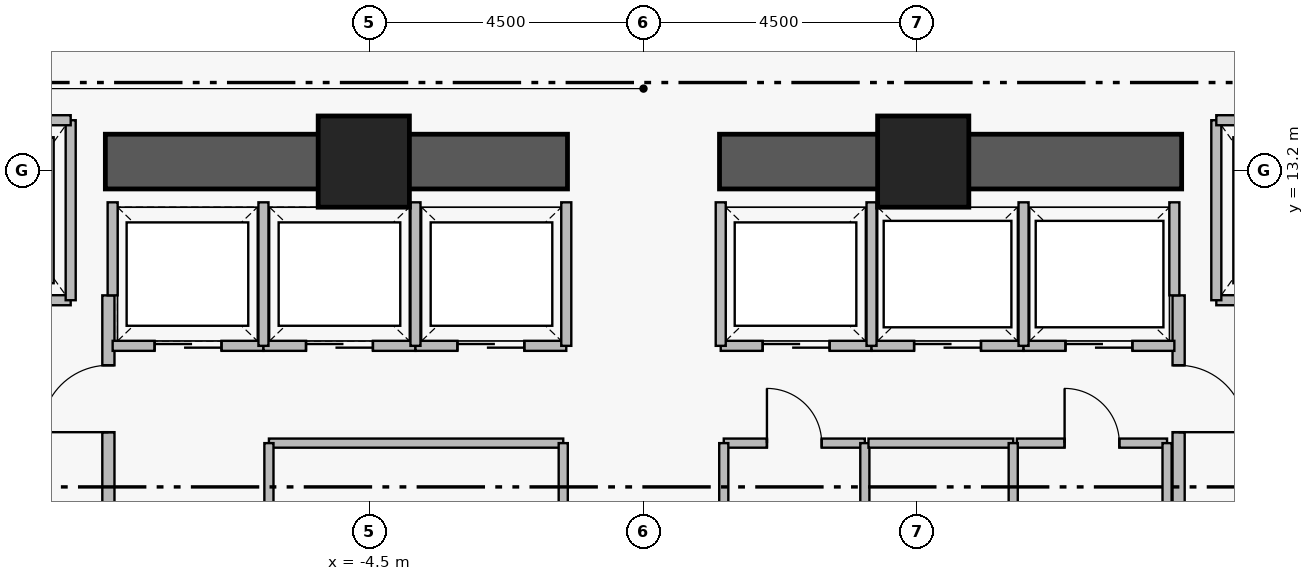
"""IFC4 building model, lengths in metres.
Left out: names, types, materials, properties, quantities, classifications, styles, units other than length and angle.
Written with IfcOpenShell. Run it as: python <this file> out.ifc"""

import sys

from ifc_helpers import new_model, si_unit, direction, frame, frame_2d, origin, origin_2d, place, context, subcontext, project, spatial, rectangle, extrude, element, fill, save


model = new_model("IFC4")
c1 = context("Model", 3, precision=1e-05, world=origin(), true_north=direction((0.0, 1.0)))
c2 = subcontext(c1, "Body", "Model", "MODEL_VIEW")
j1 = project(units=[si_unit("LENGTHUNIT", "METRE"), si_unit("PLANEANGLEUNIT", "RADIAN")], contexts=[c1])
p1 = place(None, origin())
s1 = spatial("IfcSite", under=j1, at=p1, CompositionType="ELEMENT")
p2 = place(p1, origin())
s2 = spatial("IfcBuilding", under=s1, at=p2, CompositionType="ELEMENT")
p3 = place(p2, origin())
s3 = spatial("IfcBuildingStorey", under=s2, at=p3, CompositionType="ELEMENT", Elevation=0.0)
for number, where, z_axis, x_axis in (
    (1, (-8.85, 13.35, 0.0), (0.0, 0.0, 1.0), (1.0, 0.0, 0.0)),
    (2, (1.25, 13.35, 0.0), (0.0, 0.0, 1.0), (1.0, 0.0, 0.0)),
):
    element("IfcWall", number, at=place(p3, frame(where, z_axis=z_axis, x_axis=x_axis)), inside=s3, PredefinedType="SHEAR", context=c2, shape_type="SweptSolid", body=[
        extrude(rectangle(XDim=7.6, YDim=0.9, at=frame_2d((3.8, 0.0))), origin(), (0.0, 0.0, 1.0), 5.75),
    ])
for number, where, z_axis, x_axis in (
    (3, (-4.6, 13.35, 0.0), (0.0, 0.0, 1.0), (1.0, 0.0, 0.0)),
    (4, (4.6, 13.35, 0.0), (0.0, 0.0, 1.0), (1.0, 0.0, 0.0)),
):
    element("IfcColumn", number, at=place(p3, frame(where, z_axis=z_axis, x_axis=x_axis)), inside=s3, PredefinedType="COLUMN", context=c2, shape_type="SweptSolid", body=[
        extrude(rectangle(XDim=1.5, YDim=1.5, at=origin_2d()), origin(), (0.0, 0.0, 1.0), 6.0),
    ])
p4 = place(p3, frame((-8.8, 5.05, 0.0), z_axis=(0.0, 0.0, 1.0), x_axis=(0.0, 1.0, 0.0)))
e5 = element("IfcWall", 5, at=p4, inside=s3, PredefinedType="PARTITIONING", context=c2, shape_type="SweptSolid", body=[
    extrude(rectangle(XDim=6.1, YDim=0.2, at=frame_2d((3.05, 0.0))), origin(), (0.0, 0.0, 1.0), 5.75),
])
p5 = place(p4, frame((0.25, 0.0, 0.0)))
e6 = element("IfcOpeningElement", 6, at=p5, cuts=e5, PredefinedType="OPENING", context=c2, shape_type="SweptSolid", body=[
    extrude(rectangle(XDim=1.1, YDim=2.2, at=frame_2d((0.55, 1.1))), frame((0.0, 0.11, 0.0), z_axis=(0.0, -1.0, 0.0), x_axis=(1.0, 0.0, 0.0)), (0.0, 0.0, 1.0), 0.22),
])
p6 = place(p4, frame((3.85, 0.0, 0.0)))
e7 = element("IfcOpeningElement", 7, at=p6, cuts=e5, PredefinedType="OPENING", context=c2, shape_type="SweptSolid", body=[
    extrude(rectangle(XDim=1.1, YDim=2.2, at=frame_2d((0.55, 1.1))), frame((0.0, 0.11, 0.0), z_axis=(0.0, -1.0, 0.0), x_axis=(1.0, 0.0, 0.0)), (0.0, 0.0, 1.0), 0.22),
])
p7 = place(p3, frame((8.8, 11.15, 0.0), z_axis=(0.0, 0.0, 1.0), x_axis=(0.0, -1.0, 0.0)))
e8 = element("IfcWall", 8, at=p7, inside=s3, PredefinedType="PARTITIONING", context=c2, shape_type="SweptSolid", body=[
    extrude(rectangle(XDim=6.1, YDim=0.2, at=frame_2d((3.05, 0.0))), origin(), (0.0, 0.0, 1.0), 5.75),
])
p8 = place(p7, frame((1.15, 0.0, 0.0)))
e9 = element("IfcOpeningElement", 9, at=p8, cuts=e8, PredefinedType="OPENING", context=c2, shape_type="SweptSolid", body=[
    extrude(rectangle(XDim=1.1, YDim=2.2, at=frame_2d((0.55, 1.1))), frame((0.0, 0.11, 0.0), z_axis=(0.0, -1.0, 0.0), x_axis=(1.0, 0.0, 0.0)), (0.0, 0.0, 1.0), 0.22),
])
p9 = place(p7, frame((4.75, 0.0, 0.0)))
e10 = element("IfcOpeningElement", 10, at=p9, cuts=e8, PredefinedType="OPENING", context=c2, shape_type="SweptSolid", body=[
    extrude(rectangle(XDim=1.1, YDim=2.2, at=frame_2d((0.55, 1.1))), frame((0.0, 0.11, 0.0), z_axis=(0.0, -1.0, 0.0), x_axis=(1.0, 0.0, 0.0)), (0.0, 0.0, 1.0), 0.22),
])
p10 = place(p3, frame((-11.58, 11.07, 0.0), z_axis=(0.0, 0.0, 1.0), x_axis=(1.0, 0.0, 0.0)))
e11 = element("IfcWall", 11, at=p10, inside=s3, PredefinedType="PARTITIONING", context=c2, shape_type="SweptSolid", body=[
    extrude(rectangle(XDim=2.16, YDim=0.165, at=frame_2d((1.08, 0.0))), origin(), (0.0, 0.0, 1.0), 5.75),
])
p11 = place(p10, frame((0.53, 0.0, 0.0)))
e12 = element("IfcOpeningElement", 12, at=p11, cuts=e11, PredefinedType="OPENING", context=c2, shape_type="SweptSolid", body=[
    extrude(rectangle(XDim=1.15, YDim=2.25, at=frame_2d((0.575, 1.125))), frame((0.0, 0.093, 0.0), z_axis=(0.0, -1.0, 0.0), x_axis=(1.0, 0.0, 0.0)), (0.0, 0.0, 1.0), 0.185),
])
p12 = place(p3, frame((9.42, 11.07, 0.0), z_axis=(0.0, 0.0, 1.0), x_axis=(1.0, 0.0, 0.0)))
e13 = element("IfcWall", 13, at=p12, inside=s3, PredefinedType="PARTITIONING", context=c2, shape_type="SweptSolid", body=[
    extrude(rectangle(XDim=2.16, YDim=0.165, at=frame_2d((1.08, 0.0))), origin(), (0.0, 0.0, 1.0), 5.75),
])
p13 = place(p12, frame((0.53, 0.0, 0.0)))
e14 = element("IfcOpeningElement", 14, at=p13, cuts=e13, PredefinedType="OPENING", context=c2, shape_type="SweptSolid", body=[
    extrude(rectangle(XDim=1.15, YDim=2.25, at=frame_2d((0.575, 1.125))), frame((0.0, 0.093, 0.0), z_axis=(0.0, -1.0, 0.0), x_axis=(1.0, 0.0, 0.0)), (0.0, 0.0, 1.0), 0.185),
])
p14 = place(p3, frame((-8.73, 10.32, 0.0), z_axis=(0.0, 0.0, 1.0), x_axis=(1.0, 0.0, 0.0)))
e15 = element("IfcWall", 15, at=p14, inside=s3, PredefinedType="PARTITIONING", context=c2, shape_type="SweptSolid", body=[
    extrude(rectangle(XDim=2.48, YDim=0.165, at=frame_2d((1.24, 0.0))), origin(), (0.0, 0.0, 1.0), 5.75),
])
p15 = place(p14, frame((0.69, 0.0, 0.0)))
e16 = element("IfcOpeningElement", 16, at=p15, cuts=e15, PredefinedType="OPENING", context=c2, shape_type="SweptSolid", body=[
    extrude(rectangle(XDim=1.1, YDim=2.25, at=frame_2d((0.55, 1.125))), frame((0.0, 0.093, 0.0), z_axis=(0.0, -1.0, 0.0), x_axis=(1.0, 0.0, 0.0)), (0.0, 0.0, 1.0), 0.185),
])
p16 = place(p3, frame((-6.25, 10.32, 0.0), z_axis=(0.0, 0.0, 1.0), x_axis=(1.0, 0.0, 0.0)))
e17 = element("IfcWall", 17, at=p16, inside=s3, PredefinedType="PARTITIONING", context=c2, shape_type="SweptSolid", body=[
    extrude(rectangle(XDim=2.5, YDim=0.165, at=frame_2d((1.25, 0.0))), origin(), (0.0, 0.0, 1.0), 5.75),
])
p17 = place(p16, frame((0.7, 0.0, 0.0)))
e18 = element("IfcOpeningElement", 18, at=p17, cuts=e17, PredefinedType="OPENING", context=c2, shape_type="SweptSolid", body=[
    extrude(rectangle(XDim=1.1, YDim=2.25, at=frame_2d((0.55, 1.125))), frame((0.0, 0.093, 0.0), z_axis=(0.0, -1.0, 0.0), x_axis=(1.0, 0.0, 0.0)), (0.0, 0.0, 1.0), 0.185),
])
p18 = place(p3, frame((-3.75, 10.32, 0.0), z_axis=(0.0, 0.0, 1.0), x_axis=(1.0, 0.0, 0.0)))
e19 = element("IfcWall", 19, at=p18, inside=s3, PredefinedType="PARTITIONING", context=c2, shape_type="SweptSolid", body=[
    extrude(rectangle(XDim=2.48, YDim=0.165, at=frame_2d((1.24, 0.0))), origin(), (0.0, 0.0, 1.0), 5.75),
])
p19 = place(p18, frame((0.69, 0.0, 0.0)))
e20 = element("IfcOpeningElement", 20, at=p19, cuts=e19, PredefinedType="OPENING", context=c2, shape_type="SweptSolid", body=[
    extrude(rectangle(XDim=1.1, YDim=2.25, at=frame_2d((0.55, 1.125))), frame((0.0, 0.093, 0.0), z_axis=(0.0, -1.0, 0.0), x_axis=(1.0, 0.0, 0.0)), (0.0, 0.0, 1.0), 0.185),
])
p20 = place(p3, frame((1.27, 10.32, 0.0), z_axis=(0.0, 0.0, 1.0), x_axis=(1.0, 0.0, 0.0)))
e21 = element("IfcWall", 21, at=p20, inside=s3, PredefinedType="PARTITIONING", context=c2, shape_type="SweptSolid", body=[
    extrude(rectangle(XDim=2.48, YDim=0.165, at=frame_2d((1.24, 0.0))), origin(), (0.0, 0.0, 1.0), 5.75),
])
p21 = place(p20, frame((0.69, 0.0, 0.0)))
e22 = element("IfcOpeningElement", 22, at=p21, cuts=e21, PredefinedType="OPENING", context=c2, shape_type="SweptSolid", body=[
    extrude(rectangle(XDim=1.1, YDim=2.25, at=frame_2d((0.55, 1.125))), frame((0.0, 0.093, 0.0), z_axis=(0.0, -1.0, 0.0), x_axis=(1.0, 0.0, 0.0)), (0.0, 0.0, 1.0), 0.185),
])
p22 = place(p3, frame((3.75, 10.32, 0.0), z_axis=(0.0, 0.0, 1.0), x_axis=(1.0, 0.0, 0.0)))
e23 = element("IfcWall", 23, at=p22, inside=s3, PredefinedType="PARTITIONING", context=c2, shape_type="SweptSolid", body=[
    extrude(rectangle(XDim=2.5, YDim=0.165, at=frame_2d((1.25, 0.0))), origin(), (0.0, 0.0, 1.0), 5.75),
])
p23 = place(p22, frame((0.7, 0.0, 0.0)))
e24 = element("IfcOpeningElement", 24, at=p23, cuts=e23, PredefinedType="OPENING", context=c2, shape_type="SweptSolid", body=[
    extrude(rectangle(XDim=1.1, YDim=2.25, at=frame_2d((0.55, 1.125))), frame((0.0, 0.093, 0.0), z_axis=(0.0, -1.0, 0.0), x_axis=(1.0, 0.0, 0.0)), (0.0, 0.0, 1.0), 0.185),
])
p24 = place(p3, frame((6.25, 10.32, 0.0), z_axis=(0.0, 0.0, 1.0), x_axis=(1.0, 0.0, 0.0)))
e25 = element("IfcWall", 25, at=p24, inside=s3, PredefinedType="PARTITIONING", context=c2, shape_type="SweptSolid", body=[
    extrude(rectangle(XDim=2.48, YDim=0.165, at=frame_2d((1.24, 0.0))), origin(), (0.0, 0.0, 1.0), 5.75),
])
p25 = place(p24, frame((0.69, 0.0, 0.0)))
e26 = element("IfcOpeningElement", 26, at=p25, cuts=e25, PredefinedType="OPENING", context=c2, shape_type="SweptSolid", body=[
    extrude(rectangle(XDim=1.1, YDim=2.25, at=frame_2d((0.55, 1.125))), frame((0.0, 0.093, 0.0), z_axis=(0.0, -1.0, 0.0), x_axis=(1.0, 0.0, 0.0)), (0.0, 0.0, 1.0), 0.185),
])
p26 = place(p3, frame((1.32, 8.72, 0.0), z_axis=(0.0, 0.0, 1.0), x_axis=(1.0, 0.0, 0.0)))
e27 = element("IfcWall", 27, at=p26, inside=s3, PredefinedType="PARTITIONING", context=c2, shape_type="SweptSolid", body=[
    extrude(rectangle(XDim=2.32, YDim=0.15, at=frame_2d((1.16, 0.0))), origin(), (0.0, 0.0, 1.0), 5.75),
])
p27 = place(p26, frame((0.71, 0.0, 0.0)))
e28 = element("IfcOpeningElement", 28, at=p27, cuts=e27, PredefinedType="OPENING", context=c2, shape_type="SweptSolid", body=[
    extrude(rectangle(XDim=0.9, YDim=2.15, at=frame_2d((0.45, 1.075))), frame((0.0, 0.085, 0.0), z_axis=(0.0, -1.0, 0.0), x_axis=(1.0, 0.0, 0.0)), (0.0, 0.0, 1.0), 0.17),
])
p28 = place(p3, frame((6.14, 8.72, 0.0), z_axis=(0.0, 0.0, 1.0), x_axis=(1.0, 0.0, 0.0)))
e29 = element("IfcWall", 29, at=p28, inside=s3, PredefinedType="PARTITIONING", context=c2, shape_type="SweptSolid", body=[
    extrude(rectangle(XDim=2.47, YDim=0.15, at=frame_2d((1.235, 0.0))), origin(), (0.0, 0.0, 1.0), 5.75),
])
p29 = place(p28, frame((0.785, 0.0, 0.0)))
e30 = element("IfcOpeningElement", 30, at=p29, cuts=e29, PredefinedType="OPENING", context=c2, shape_type="SweptSolid", body=[
    extrude(rectangle(XDim=0.9, YDim=2.15, at=frame_2d((0.45, 1.075))), frame((0.0, 0.085, 0.0), z_axis=(0.0, -1.0, 0.0), x_axis=(1.0, 0.0, 0.0)), (0.0, 0.0, 1.0), 0.17),
])
p30 = place(p3, frame((-9.42, 11.07, 0.0), z_axis=(0.0, 0.0, 1.0), x_axis=(0.0, 1.0, 0.0)))
e31 = element("IfcWall", 31, at=p30, inside=s3, PredefinedType="PARTITIONING", context=c2, shape_type="SweptSolid", body=[
    extrude(rectangle(XDim=2.96, YDim=0.165, at=frame_2d((1.48, 0.0))), origin(), (0.0, 0.0, 1.0), 5.75),
])
p31 = place(p3, frame((-11.58, 14.03, 0.0), z_axis=(0.0, 0.0, 1.0), x_axis=(1.0, 0.0, 0.0)))
e32 = element("IfcWall", 32, at=p31, inside=s3, PredefinedType="PARTITIONING", context=c2, shape_type="SweptSolid", body=[
    extrude(rectangle(XDim=2.16, YDim=0.165, at=frame_2d((1.08, 0.0))), origin(), (0.0, 0.0, 1.0), 5.75),
])
p32 = place(p3, frame((9.42, 11.07, 0.0), z_axis=(0.0, 0.0, 1.0), x_axis=(0.0, 1.0, 0.0)))
e33 = element("IfcWall", 33, at=p32, inside=s3, PredefinedType="PARTITIONING", context=c2, shape_type="SweptSolid", body=[
    extrude(rectangle(XDim=2.96, YDim=0.165, at=frame_2d((1.48, 0.0))), origin(), (0.0, 0.0, 1.0), 5.75),
])
p33 = place(p3, frame((9.42, 14.03, 0.0), z_axis=(0.0, 0.0, 1.0), x_axis=(1.0, 0.0, 0.0)))
e34 = element("IfcWall", 34, at=p33, inside=s3, PredefinedType="PARTITIONING", context=c2, shape_type="SweptSolid", body=[
    extrude(rectangle(XDim=2.16, YDim=0.165, at=frame_2d((1.08, 0.0))), origin(), (0.0, 0.0, 1.0), 5.75),
])
p34 = place(p3, frame((-8.73, 11.15, 0.0), z_axis=(0.0, 0.0, 1.0), x_axis=(0.0, 1.0, 0.0)))
e35 = element("IfcWall", 35, at=p34, inside=s3, PredefinedType="PARTITIONING", context=c2, shape_type="SweptSolid", body=[
    extrude(rectangle(XDim=1.53, YDim=0.165, at=frame_2d((0.765, 0.0))), origin(), (0.0, 0.0, 1.0), 5.75),
])
for number, where, z_axis, x_axis in (
    (36, (-6.25, 10.32, 0.0), (0.0, 0.0, 1.0), (0.0, 1.0, 0.0)),
    (37, (-3.75, 10.32, 0.0), (0.0, 0.0, 1.0), (0.0, 1.0, 0.0)),
    (38, (-1.27, 10.32, 0.0), (0.0, 0.0, 1.0), (0.0, 1.0, 0.0)),
    (39, (1.27, 10.32, 0.0), (0.0, 0.0, 1.0), (0.0, 1.0, 0.0)),
    (40, (3.75, 10.32, 0.0), (0.0, 0.0, 1.0), (0.0, 1.0, 0.0)),
    (41, (6.25, 10.32, 0.0), (0.0, 0.0, 1.0), (0.0, 1.0, 0.0)),
):
    element("IfcWall", number, at=place(p3, frame(where, z_axis=z_axis, x_axis=x_axis)), inside=s3, PredefinedType="PARTITIONING", context=c2, shape_type="SweptSolid", body=[
        extrude(rectangle(XDim=2.36, YDim=0.165, at=frame_2d((1.18, 0.0))), origin(), (0.0, 0.0, 1.0), 5.75),
    ])
p35 = place(p3, frame((8.73, 11.15, 0.0), z_axis=(0.0, 0.0, 1.0), x_axis=(0.0, 1.0, 0.0)))
e42 = element("IfcWall", 42, at=p35, inside=s3, PredefinedType="PARTITIONING", context=c2, shape_type="SweptSolid", body=[
    extrude(rectangle(XDim=1.53, YDim=0.165, at=frame_2d((0.765, 0.0))), origin(), (0.0, 0.0, 1.0), 5.75),
])
p36 = place(p3, frame((-6.16, 8.72, 0.0), z_axis=(0.0, 0.0, 1.0), x_axis=(1.0, 0.0, 0.0)))
e43 = element("IfcWall", 43, at=p36, inside=s3, PredefinedType="PARTITIONING", context=c2, shape_type="SweptSolid", body=[
    extrude(rectangle(XDim=4.84, YDim=0.15, at=frame_2d((2.42, 0.0))), origin(), (0.0, 0.0, 1.0), 5.75),
])
for number, where, z_axis, x_axis in (
    (44, (-6.16, 6.48, 0.0), (0.0, 0.0, 1.0), (0.0, 1.0, 0.0)),
    (45, (-1.32, 6.48, 0.0), (0.0, 0.0, 1.0), (0.0, 1.0, 0.0)),
    (46, (1.32, 6.48, 0.0), (0.0, 0.0, 1.0), (0.0, 1.0, 0.0)),
    (47, (3.64, 6.48, 0.0), (0.0, 0.0, 1.0), (0.0, 1.0, 0.0)),
):
    element("IfcWall", number, at=place(p3, frame(where, z_axis=z_axis, x_axis=x_axis)), inside=s3, PredefinedType="PARTITIONING", context=c2, shape_type="SweptSolid", body=[
        extrude(rectangle(XDim=2.24, YDim=0.15, at=frame_2d((1.12, 0.0))), origin(), (0.0, 0.0, 1.0), 5.75),
    ])
p37 = place(p3, frame((3.7, 8.72, 0.0), z_axis=(0.0, 0.0, 1.0), x_axis=(1.0, 0.0, 0.0)))
e48 = element("IfcWall", 48, at=p37, inside=s3, PredefinedType="PARTITIONING", context=c2, shape_type="SweptSolid", body=[
    extrude(rectangle(XDim=2.38, YDim=0.15, at=frame_2d((1.19, 0.0))), origin(), (0.0, 0.0, 1.0), 5.75),
])
for number, where, z_axis, x_axis in (
    (49, (6.08, 6.48, 0.0), (0.0, 0.0, 1.0), (0.0, 1.0, 0.0)),
    (50, (8.61, 6.48, 0.0), (0.0, 0.0, 1.0), (0.0, 1.0, 0.0)),
):
    element("IfcWall", number, at=place(p3, frame(where, z_axis=z_axis, x_axis=x_axis)), inside=s3, PredefinedType="PARTITIONING", context=c2, shape_type="SweptSolid", body=[
        extrude(rectangle(XDim=2.24, YDim=0.15, at=frame_2d((1.12, 0.0))), origin(), (0.0, 0.0, 1.0), 5.75),
    ])
p38 = place(p6, origin())
e51 = element("IfcDoor", 51, at=p38, inside=s3, OperationType="SINGLE_SWING_LEFT", PredefinedType="DOOR", context=c2, shape_type="SweptSolid", body=[
    extrude(rectangle(XDim=1.1, YDim=2.2, at=frame_2d((0.55, 1.1))), frame((0.0, 0.025, 0.0), z_axis=(0.0, -1.0, 0.0), x_axis=(1.0, 0.0, 0.0)), (0.0, 0.0, 1.0), 0.05),
])
fill(e7, e51)
p39 = place(p8, origin())
e52 = element("IfcDoor", 52, at=p39, inside=s3, OperationType="SINGLE_SWING_RIGHT", PredefinedType="DOOR", context=c2, shape_type="SweptSolid", body=[
    extrude(rectangle(XDim=1.1, YDim=2.2, at=frame_2d((0.55, 1.1))), frame((0.0, 0.025, 0.0), z_axis=(0.0, -1.0, 0.0), x_axis=(1.0, 0.0, 0.0)), (0.0, 0.0, 1.0), 0.05),
])
fill(e9, e52)
p40 = place(p15, origin())
e53 = element("IfcDoor", 53, at=p40, inside=s3, OperationType="SLIDING_TO_LEFT", PredefinedType="DOOR", context=c2, shape_type="SweptSolid", body=[
    extrude(rectangle(XDim=1.1, YDim=2.25, at=frame_2d((0.55, 1.125))), frame((0.0, 0.025, 0.0), z_axis=(0.0, -1.0, 0.0), x_axis=(1.0, 0.0, 0.0)), (0.0, 0.0, 1.0), 0.05),
])
fill(e16, e53)
p41 = place(p17, origin())
e54 = element("IfcDoor", 54, at=p41, inside=s3, OperationType="SLIDING_TO_LEFT", PredefinedType="DOOR", context=c2, shape_type="SweptSolid", body=[
    extrude(rectangle(XDim=1.1, YDim=2.25, at=frame_2d((0.55, 1.125))), frame((0.0, 0.025, 0.0), z_axis=(0.0, -1.0, 0.0), x_axis=(1.0, 0.0, 0.0)), (0.0, 0.0, 1.0), 0.05),
])
fill(e18, e54)
p42 = place(p19, origin())
e55 = element("IfcDoor", 55, at=p42, inside=s3, OperationType="SLIDING_TO_LEFT", PredefinedType="DOOR", context=c2, shape_type="SweptSolid", body=[
    extrude(rectangle(XDim=1.1, YDim=2.25, at=frame_2d((0.55, 1.125))), frame((0.0, 0.025, 0.0), z_axis=(0.0, -1.0, 0.0), x_axis=(1.0, 0.0, 0.0)), (0.0, 0.0, 1.0), 0.05),
])
fill(e20, e55)
p43 = place(p21, origin())
e56 = element("IfcDoor", 56, at=p43, inside=s3, OperationType="SLIDING_TO_LEFT", PredefinedType="DOOR", context=c2, shape_type="SweptSolid", body=[
    extrude(rectangle(XDim=1.1, YDim=2.25, at=frame_2d((0.55, 1.125))), frame((0.0, 0.025, 0.0), z_axis=(0.0, -1.0, 0.0), x_axis=(1.0, 0.0, 0.0)), (0.0, 0.0, 1.0), 0.05),
])
fill(e22, e56)
p44 = place(p23, origin())
e57 = element("IfcDoor", 57, at=p44, inside=s3, OperationType="SLIDING_TO_LEFT", PredefinedType="DOOR", context=c2, shape_type="SweptSolid", body=[
    extrude(rectangle(XDim=1.1, YDim=2.25, at=frame_2d((0.55, 1.125))), frame((0.0, 0.025, 0.0), z_axis=(0.0, -1.0, 0.0), x_axis=(1.0, 0.0, 0.0)), (0.0, 0.0, 1.0), 0.05),
])
fill(e24, e57)
p45 = place(p25, origin())
e58 = element("IfcDoor", 58, at=p45, inside=s3, OperationType="SLIDING_TO_LEFT", PredefinedType="DOOR", context=c2, shape_type="SweptSolid", body=[
    extrude(rectangle(XDim=1.1, YDim=2.25, at=frame_2d((0.55, 1.125))), frame((0.0, 0.025, 0.0), z_axis=(0.0, -1.0, 0.0), x_axis=(1.0, 0.0, 0.0)), (0.0, 0.0, 1.0), 0.05),
])
fill(e26, e58)
p46 = place(p27, origin())
e59 = element("IfcDoor", 59, at=p46, inside=s3, OperationType="SINGLE_SWING_LEFT", PredefinedType="DOOR", context=c2, shape_type="SweptSolid", body=[
    extrude(rectangle(XDim=0.9, YDim=2.15, at=frame_2d((0.45, 1.075))), frame((0.0, 0.025, 0.0), z_axis=(0.0, -1.0, 0.0), x_axis=(1.0, 0.0, 0.0)), (0.0, 0.0, 1.0), 0.05),
])
fill(e28, e59)
p47 = place(p29, origin())
e60 = element("IfcDoor", 60, at=p47, inside=s3, OperationType="SINGLE_SWING_LEFT", PredefinedType="DOOR", context=c2, shape_type="SweptSolid", body=[
    extrude(rectangle(XDim=0.9, YDim=2.15, at=frame_2d((0.45, 1.075))), frame((0.0, 0.025, 0.0), z_axis=(0.0, -1.0, 0.0), x_axis=(1.0, 0.0, 0.0)), (0.0, 0.0, 1.0), 0.05),
])
fill(e30, e60)
save(model, sys.argv[1])
